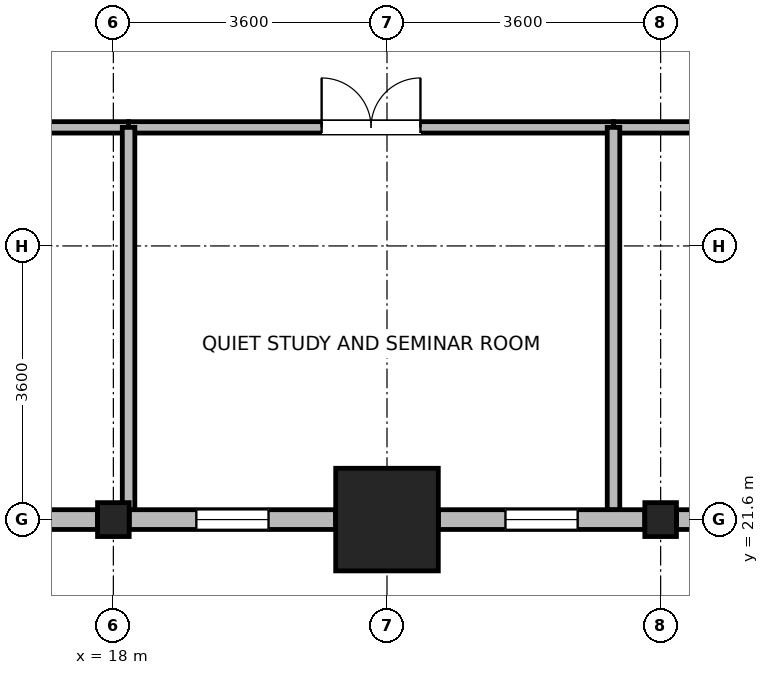
"""IFC4 building model, lengths in metres.
Left out: names, types, materials, properties, quantities, classifications, styles, units other than length and angle.
Written with IfcOpenShell. Run it as: python <this file> out.ifc"""

import sys

from ifc_helpers import new_model, si_unit, direction, frame, frame_2d, origin, origin_2d, place, context, subcontext, project, spatial, rectangle, i_section, extrude, source, transform, mapped, element, fill, save


model = new_model("IFC4")
c1 = context("Model", 3, precision=1e-05, world=origin(), true_north=direction((0.0, 1.0)))
c2 = subcontext(c1, "Body", "Model", "MODEL_VIEW")
j1 = project(units=[si_unit("LENGTHUNIT", "METRE"), si_unit("PLANEANGLEUNIT", "RADIAN")], contexts=[c1])
p1 = place(None, origin())
s1 = spatial("IfcSite", under=j1, at=p1, CompositionType="ELEMENT")
p2 = place(p1, origin())
s2 = spatial("IfcBuilding", under=s1, at=p2, CompositionType="ELEMENT")
p3 = place(p2, frame((0.0, 0.0, 32.7)))
s3 = spatial("IfcBuildingStorey", under=s2, at=p3, CompositionType="ELEMENT", Elevation=32.7)
m1 = source(origin(), c2, "Body", "SweptSolid", [
    extrude(rectangle(XDim=1.35, YDim=1.35, at=origin_2d()), origin(), (0.0, 0.0, 1.0), 3.7),
])
p4 = place(p3, frame((21.6, 21.6, 0.0), z_axis=(0.0, 0.0, 1.0), x_axis=(1.0, 0.0, 0.0)))
e1 = element("IfcColumn", 1, at=p4, inside=s3, PredefinedType="COLUMN", context=c2, shape_type="MappedRepresentation", body=[
    mapped(m1, transform((0.0, 0.0, 0.0), x_axis=(1.0, 0.0, 0.0), y_axis=(0.0, 1.0, 0.0), z_axis=(0.0, 0.0, 1.0), scale=1.0)),
])
m2 = source(origin(), c2, "Body", "SweptSolid", [
    extrude(i_section(OverallWidth=0.416, OverallDepth=0.446, WebThickness=0.029, FlangeThickness=0.04, FilletRadius=0.015, at=origin_2d()), origin(), (0.0, 0.0, 1.0), 3.7),
])
for number, where, z_axis, x_axis in (
    (2, (18.0, 21.6, 0.0), (0.0, 0.0, 1.0), (1.0, 0.0, 0.0)),
    (3, (25.2, 21.6, 0.0), (0.0, 0.0, 1.0), (1.0, 0.0, 0.0)),
):
    element("IfcColumn", number, at=place(p3, frame(where, z_axis=z_axis, x_axis=x_axis)), inside=s3, PredefinedType="COLUMN", context=c2, shape_type="MappedRepresentation", body=[
        mapped(m2, transform((0.0, 0.0, 0.0), x_axis=(1.0, 0.0, 0.0), y_axis=(0.0, 1.0, 0.0), z_axis=(0.0, 0.0, 1.0), scale=1.0)),
    ])
p5 = place(p3, frame((17.791, 21.6, 0.0), z_axis=(0.0, 0.0, 1.0), x_axis=(-1.0, 0.0, 0.0)))
e4 = element("IfcWall", 4, at=p5, inside=s3, PredefinedType="STANDARD", context=c2, shape_type="SweptSolid", body=[
    extrude(rectangle(XDim=2.715, YDim=0.26, at=frame_2d((1.357, 0.0))), origin(), (0.0, 0.0, 1.0), 2.93),
])
p6 = place(p5, frame((0.883, 0.0, 0.85)))
e5 = element("IfcOpeningElement", 5, at=p6, cuts=e4, PredefinedType="OPENING", context=c2, shape_type="SweptSolid", body=[
    extrude(rectangle(XDim=0.95, YDim=1.75, at=frame_2d((0.475, 0.875))), frame((0.0, 0.14, 0.0), z_axis=(0.0, -1.0, 0.0), x_axis=(1.0, 0.0, 0.0)), (0.0, 0.0, 1.0), 0.28),
])
p7 = place(p3, frame((20.924, 21.6, 0.0), z_axis=(0.0, 0.0, 1.0), x_axis=(-1.0, 0.0, 0.0)))
e6 = element("IfcWall", 6, at=p7, inside=s3, PredefinedType="STANDARD", context=c2, shape_type="SweptSolid", body=[
    extrude(rectangle(XDim=2.715, YDim=0.26, at=frame_2d((1.357, 0.0))), origin(), (0.0, 0.0, 1.0), 2.93),
])
p8 = place(p7, frame((0.883, 0.0, 0.85)))
e7 = element("IfcOpeningElement", 7, at=p8, cuts=e6, PredefinedType="OPENING", context=c2, shape_type="SweptSolid", body=[
    extrude(rectangle(XDim=0.95, YDim=1.75, at=frame_2d((0.475, 0.875))), frame((0.0, 0.14, 0.0), z_axis=(0.0, -1.0, 0.0), x_axis=(1.0, 0.0, 0.0)), (0.0, 0.0, 1.0), 0.28),
])
p9 = place(p3, frame((24.991, 21.6, 0.0), z_axis=(0.0, 0.0, 1.0), x_axis=(-1.0, 0.0, 0.0)))
e8 = element("IfcWall", 8, at=p9, inside=s3, PredefinedType="STANDARD", context=c2, shape_type="SweptSolid", body=[
    extrude(rectangle(XDim=2.715, YDim=0.26, at=frame_2d((1.357, 0.0))), origin(), (0.0, 0.0, 1.0), 2.93),
])
p10 = place(p9, frame((0.883, 0.0, 0.85)))
e9 = element("IfcOpeningElement", 9, at=p10, cuts=e8, PredefinedType="OPENING", context=c2, shape_type="SweptSolid", body=[
    extrude(rectangle(XDim=0.95, YDim=1.75, at=frame_2d((0.475, 0.875))), frame((0.0, 0.14, 0.0), z_axis=(0.0, -1.0, 0.0), x_axis=(1.0, 0.0, 0.0)), (0.0, 0.0, 1.0), 0.28),
])
p11 = place(p3, frame((28.124, 21.6, 0.0), z_axis=(0.0, 0.0, 1.0), x_axis=(-1.0, 0.0, 0.0)))
e10 = element("IfcWall", 10, at=p11, inside=s3, PredefinedType="STANDARD", context=c2, shape_type="SweptSolid", body=[
    extrude(rectangle(XDim=2.715, YDim=0.26, at=frame_2d((1.357, 0.0))), origin(), (0.0, 0.0, 1.0), 2.93),
])
p12 = place(p11, frame((0.883, 0.0, 0.85)))
e11 = element("IfcOpeningElement", 11, at=p12, cuts=e10, PredefinedType="OPENING", context=c2, shape_type="SweptSolid", body=[
    extrude(rectangle(XDim=0.95, YDim=1.75, at=frame_2d((0.475, 0.875))), frame((0.0, 0.14, 0.0), z_axis=(0.0, -1.0, 0.0), x_axis=(1.0, 0.0, 0.0)), (0.0, 0.0, 1.0), 0.28),
])
p13 = place(p3, frame((10.24, 26.76, 0.0), z_axis=(0.0, 0.0, 1.0), x_axis=(1.0, 0.0, 0.0)))
e12 = element("IfcWall", 12, at=p13, inside=s3, PredefinedType="PARTITIONING", context=c2, shape_type="SweptSolid", body=[
    extrude(rectangle(XDim=7.96, YDim=0.15, at=frame_2d((3.98, 0.0))), origin(), (0.0, 0.0, 1.0), 3.43),
])
p14 = place(p13, frame((2.072, 0.0, 0.0)))
e13 = element("IfcOpeningElement", 13, at=p14, cuts=e12, PredefinedType="OPENING", context=c2, shape_type="SweptSolid", body=[
    extrude(rectangle(XDim=0.95, YDim=2.1, at=frame_2d((0.475, 1.05))), frame((0.0, 0.085, 0.0), z_axis=(0.0, -1.0, 0.0), x_axis=(1.0, 0.0, 0.0)), (0.0, 0.0, 1.0), 0.17),
])
p15 = place(p3, frame((18.2, 26.76, 0.0), z_axis=(0.0, 0.0, 1.0), x_axis=(1.0, 0.0, 0.0)))
e14 = element("IfcWall", 14, at=p15, inside=s3, PredefinedType="PARTITIONING", context=c2, shape_type="SweptSolid", body=[
    extrude(rectangle(XDim=6.38, YDim=0.15, at=frame_2d((3.19, 0.0))), origin(), (0.0, 0.0, 1.0), 3.43),
])
p16 = place(p15, frame((2.54, 0.0, 0.0)))
e15 = element("IfcOpeningElement", 15, at=p16, cuts=e14, PredefinedType="OPENING", context=c2, shape_type="SweptSolid", body=[
    extrude(rectangle(XDim=1.3, YDim=2.12, at=frame_2d((0.65, 1.06))), frame((0.0, 0.085, 0.0), z_axis=(0.0, -1.0, 0.0), x_axis=(1.0, 0.0, 0.0)), (0.0, 0.0, 1.0), 0.17),
])
p17 = place(p3, frame((24.58, 26.76, 0.0), z_axis=(0.0, 0.0, 1.0), x_axis=(1.0, 0.0, 0.0)))
e16 = element("IfcWall", 16, at=p17, inside=s3, PredefinedType="PARTITIONING", context=c2, shape_type="SweptSolid", body=[
    extrude(rectangle(XDim=5.86, YDim=0.15, at=frame_2d((2.93, 0.0))), origin(), (0.0, 0.0, 1.0), 3.43),
])
p18 = place(p17, frame((2.455, 0.0, 0.0)))
e17 = element("IfcOpeningElement", 17, at=p18, cuts=e16, PredefinedType="OPENING", context=c2, shape_type="SweptSolid", body=[
    extrude(rectangle(XDim=0.95, YDim=2.1, at=frame_2d((0.475, 1.05))), frame((0.0, 0.085, 0.0), z_axis=(0.0, -1.0, 0.0), x_axis=(1.0, 0.0, 0.0)), (0.0, 0.0, 1.0), 0.17),
])
p19 = place(p3, frame((18.2, 21.732, 0.0), z_axis=(0.0, 0.0, 1.0), x_axis=(0.0, 1.0, 0.0)))
e18 = element("IfcWall", 18, at=p19, inside=s3, PredefinedType="PARTITIONING", context=c2, shape_type="SweptSolid", body=[
    extrude(rectangle(XDim=5.028, YDim=0.165, at=frame_2d((2.514, 0.0))), origin(), (0.0, 0.0, 1.0), 3.07),
])
p20 = place(p3, frame((24.58, 21.732, 0.0), z_axis=(0.0, 0.0, 1.0), x_axis=(0.0, 1.0, 0.0)))
e19 = element("IfcWall", 19, at=p20, inside=s3, PredefinedType="PARTITIONING", context=c2, shape_type="SweptSolid", body=[
    extrude(rectangle(XDim=5.028, YDim=0.165, at=frame_2d((2.514, 0.0))), origin(), (0.0, 0.0, 1.0), 3.43),
])
p21 = place(p8, origin())
e20 = element("IfcWindow", 20, at=p21, inside=s3, PartitioningType="SINGLE_PANEL", PredefinedType="WINDOW", context=c2, shape_type="SweptSolid", body=[
    extrude(rectangle(XDim=0.95, YDim=1.75, at=frame_2d((0.475, 0.875))), frame((0.0, 0.03, 0.0), z_axis=(0.0, -1.0, 0.0), x_axis=(1.0, 0.0, 0.0)), (0.0, 0.0, 1.0), 0.06),
])
fill(e7, e20)
p22 = place(p10, origin())
e21 = element("IfcWindow", 21, at=p22, inside=s3, PartitioningType="SINGLE_PANEL", PredefinedType="WINDOW", context=c2, shape_type="SweptSolid", body=[
    extrude(rectangle(XDim=0.95, YDim=1.75, at=frame_2d((0.475, 0.875))), frame((0.0, 0.03, 0.0), z_axis=(0.0, -1.0, 0.0), x_axis=(1.0, 0.0, 0.0)), (0.0, 0.0, 1.0), 0.06),
])
fill(e9, e21)
p23 = place(p16, origin())
e22 = element("IfcDoor", 22, at=p23, inside=s3, OperationType="DOUBLE_DOOR_SINGLE_SWING", PredefinedType="DOOR", context=c2, shape_type="SweptSolid", body=[
    extrude(rectangle(XDim=1.3, YDim=2.12, at=frame_2d((0.65, 1.06))), frame((0.0, 0.025, 0.0), z_axis=(0.0, -1.0, 0.0), x_axis=(1.0, 0.0, 0.0)), (0.0, 0.0, 1.0), 0.05),
])
fill(e15, e22)
save(model, sys.argv[1])
